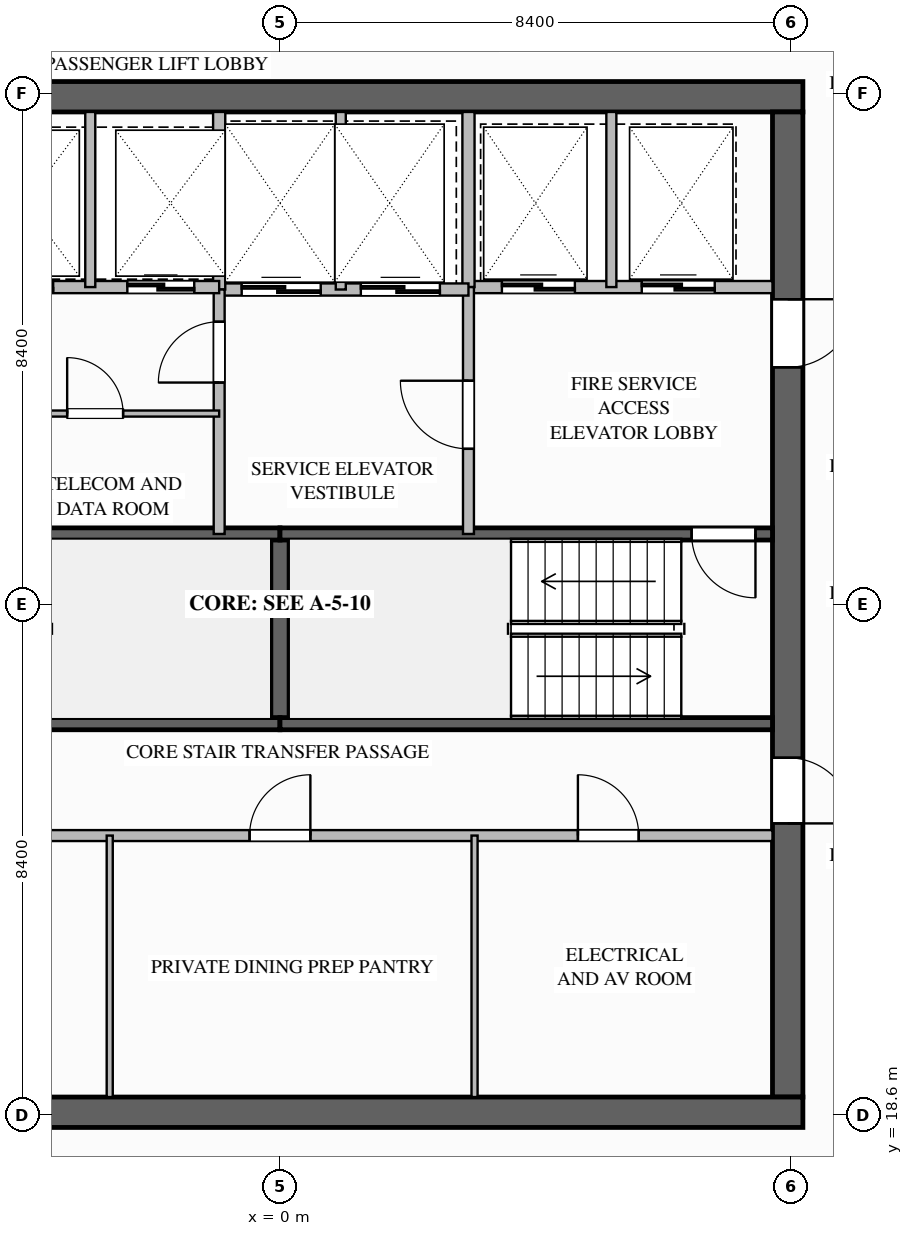
"""IFC4 building model, lengths in metres.
Left out: names, types, materials, properties, quantities, classifications, styles, units other than length and angle.
Written with IfcOpenShell. Run it as: python <this file> out.ifc"""

import sys

from ifc_helpers import new_model, si_unit, direction, frame, frame_2d, origin, place, context, subcontext, project, spatial, rectangle, extrude, element, fill, save


model = new_model("IFC4")
c1 = context("Model", 3, precision=1e-05, world=origin(), true_north=direction((0.0, 1.0)))
c2 = subcontext(c1, "Body", "Model", "MODEL_VIEW")
j1 = project(units=[si_unit("LENGTHUNIT", "METRE"), si_unit("PLANEANGLEUNIT", "RADIAN")], contexts=[c1])
p1 = place(None, origin())
s1 = spatial("IfcSite", under=j1, at=p1, CompositionType="ELEMENT")
p2 = place(p1, origin())
s2 = spatial("IfcBuilding", under=s1, at=p2, CompositionType="ELEMENT")
p3 = place(p2, frame((0.0, 0.0, 208.7)))
s3 = spatial("IfcBuildingStorey", under=s2, at=p3, CompositionType="ELEMENT", Elevation=208.7)
p4 = place(p3, frame((-8.6, 35.35, 0.0), z_axis=(0.0, 0.0, 1.0), x_axis=(1.0, 0.0, 0.0)))
e1 = element("IfcWall", 1, at=p4, inside=s3, PredefinedType="SHEAR", context=c2, shape_type="SweptSolid", body=[
    extrude(rectangle(XDim=17.2, YDim=0.5, at=frame_2d((8.6, 0.0))), origin(), (0.0, 0.0, 1.0), 3.6),
])
p5 = place(p3, frame((8.35, 35.1, 0.0), z_axis=(0.0, 0.0, 1.0), x_axis=(0.0, -1.0, 0.0)))
e2 = element("IfcWall", 2, at=p5, inside=s3, PredefinedType="SHEAR", context=c2, shape_type="SweptSolid", body=[
    extrude(rectangle(XDim=16.2, YDim=0.5, at=frame_2d((8.1, 0.0))), origin(), (0.0, 0.0, 1.0), 3.6),
])
p6 = place(p5, frame((3.08, 0.0, 0.0)))
e3 = element("IfcOpeningElement", 3, at=p6, cuts=e2, PredefinedType="OPENING", context=c2, shape_type="SweptSolid", body=[
    extrude(rectangle(XDim=1.12, YDim=2.1, at=frame_2d((0.56, 1.05))), frame((0.0, 0.26, 0.0), z_axis=(0.0, -1.0, 0.0), x_axis=(1.0, 0.0, 0.0)), (0.0, 0.0, 1.0), 0.52),
])
p7 = place(p5, frame((10.62, 0.0, 0.0)))
e4 = element("IfcOpeningElement", 4, at=p7, cuts=e2, PredefinedType="OPENING", context=c2, shape_type="SweptSolid", body=[
    extrude(rectangle(XDim=1.08, YDim=2.04, at=frame_2d((0.54, 1.02))), frame((0.0, 0.26, 0.0), z_axis=(0.0, -1.0, 0.0), x_axis=(1.0, 0.0, 0.0)), (0.0, 0.0, 1.0), 0.52),
])
p8 = place(p3, frame((8.6, 18.65, 0.0), z_axis=(0.0, 0.0, 1.0), x_axis=(-1.0, 0.0, 0.0)))
e5 = element("IfcWall", 5, at=p8, inside=s3, PredefinedType="SHEAR", context=c2, shape_type="SweptSolid", body=[
    extrude(rectangle(XDim=17.2, YDim=0.5, at=frame_2d((8.6, 0.0))), origin(), (0.0, 0.0, 1.0), 3.6),
])
p9 = place(p3, frame((0.0, 25.04, 0.0), z_axis=(0.0, 0.0, 1.0), x_axis=(0.0, 1.0, 0.0)))
e6 = element("IfcWall", 6, at=p9, inside=s3, PredefinedType="SOLIDWALL", context=c2, shape_type="SweptSolid", body=[
    extrude(rectangle(XDim=3.12, YDim=0.3, at=frame_2d((1.56, 0.0))), origin(), (0.0, 0.0, 1.0), 3.34),
])
p10 = place(p3, frame((-8.1, 25.04, 0.0), z_axis=(0.0, 0.0, 1.0), x_axis=(1.0, 0.0, 0.0)))
e7 = element("IfcWall", 7, at=p10, inside=s3, PredefinedType="SOLIDWALL", context=c2, shape_type="SweptSolid", body=[
    extrude(rectangle(XDim=8.1, YDim=0.2, at=frame_2d((4.05, 0.0))), origin(), (0.0, 0.0, 1.0), 3.34),
])
p11 = place(p10, frame((0.28, 0.0, 0.0)))
e8 = element("IfcOpeningElement", 8, at=p11, cuts=e7, PredefinedType="OPENING", context=c2, shape_type="SweptSolid", body=[
    extrude(rectangle(XDim=1.05, YDim=2.1, at=frame_2d((0.525, 1.05))), frame((0.0, 0.11, 0.0), z_axis=(0.0, -1.0, 0.0), x_axis=(1.0, 0.0, 0.0)), (0.0, 0.0, 1.0), 0.22),
])
for number, where, z_axis, x_axis in (
    (9, (-8.1, 28.16, 0.0), (0.0, 0.0, 1.0), (1.0, 0.0, 0.0)),
    (10, (0.0, 25.04, 0.0), (0.0, 0.0, 1.0), (1.0, 0.0, 0.0)),
):
    element("IfcWall", number, at=place(p3, frame(where, z_axis=z_axis, x_axis=x_axis)), inside=s3, PredefinedType="SOLIDWALL", context=c2, shape_type="SweptSolid", body=[
        extrude(rectangle(XDim=8.1, YDim=0.2, at=frame_2d((4.05, 0.0))), origin(), (0.0, 0.0, 1.0), 3.34),
    ])
p12 = place(p3, frame((8.1, 28.16, 0.0), z_axis=(0.0, 0.0, 1.0), x_axis=(-1.0, 0.0, 0.0)))
e11 = element("IfcWall", 11, at=p12, inside=s3, PredefinedType="SOLIDWALL", context=c2, shape_type="SweptSolid", body=[
    extrude(rectangle(XDim=8.1, YDim=0.2, at=frame_2d((4.05, 0.0))), origin(), (0.0, 0.0, 1.0), 3.34),
])
p13 = place(p12, frame((0.28, 0.0, 0.0)))
e12 = element("IfcOpeningElement", 12, at=p13, cuts=e11, PredefinedType="OPENING", context=c2, shape_type="SweptSolid", body=[
    extrude(rectangle(XDim=1.05, YDim=2.1, at=frame_2d((0.525, 1.05))), frame((0.0, 0.11, 0.0), z_axis=(0.0, -1.0, 0.0), x_axis=(1.0, 0.0, 0.0)), (0.0, 0.0, 1.0), 0.22),
])
p14 = place(p3, frame((3.1, 32.22, 0.0), z_axis=(0.0, 0.0, 1.0), x_axis=(1.0, 0.0, 0.0)))
e13 = element("IfcWall", 13, at=p14, inside=s3, PredefinedType="SOLIDWALL", context=c2, shape_type="SweptSolid", body=[
    extrude(rectangle(XDim=5.0, YDim=0.2, at=frame_2d((2.5, 0.0))), origin(), (0.0, 0.0, 1.0), 3.34),
])
p15 = place(p14, frame((0.55, 0.0, 0.0)))
e14 = element("IfcOpeningElement", 14, at=p15, cuts=e13, PredefinedType="OPENING", context=c2, shape_type="SweptSolid", body=[
    extrude(rectangle(XDim=1.2, YDim=2.2, at=frame_2d((0.6, 1.1))), frame((0.0, 0.11, 0.0), z_axis=(0.0, -1.0, 0.0), x_axis=(1.0, 0.0, 0.0)), (0.0, 0.0, 1.0), 0.22),
])
p16 = place(p14, frame((2.85, 0.0, 0.0)))
e15 = element("IfcOpeningElement", 15, at=p16, cuts=e13, PredefinedType="OPENING", context=c2, shape_type="SweptSolid", body=[
    extrude(rectangle(XDim=1.2, YDim=2.2, at=frame_2d((0.6, 1.1))), frame((0.0, 0.11, 0.0), z_axis=(0.0, -1.0, 0.0), x_axis=(1.0, 0.0, 0.0)), (0.0, 0.0, 1.0), 0.22),
])
p17 = place(p3, frame((3.1, 32.22, 0.0), z_axis=(0.0, 0.0, 1.0), x_axis=(0.0, 1.0, 0.0)))
e16 = element("IfcWall", 16, at=p17, inside=s3, PredefinedType="SOLIDWALL", context=c2, shape_type="SweptSolid", body=[
    extrude(rectangle(XDim=2.88, YDim=0.2, at=frame_2d((1.44, 0.0))), origin(), (0.0, 0.0, 1.0), 3.34),
])
p18 = place(p3, frame((5.45, 32.22, 0.0), z_axis=(0.0, 0.0, 1.0), x_axis=(0.0, 1.0, 0.0)))
e17 = element("IfcWall", 17, at=p18, inside=s3, PredefinedType="PARTITIONING", context=c2, shape_type="SweptSolid", body=[
    extrude(rectangle(XDim=2.88, YDim=0.165, at=frame_2d((1.44, 0.0))), origin(), (0.0, 0.0, 1.0), 3.34),
])
p19 = place(p3, frame((3.1, 28.16, 0.0), z_axis=(0.0, 0.0, 1.0), x_axis=(0.0, 1.0, 0.0)))
e18 = element("IfcWall", 18, at=p19, inside=s3, PredefinedType="SOLIDWALL", context=c2, shape_type="SweptSolid", body=[
    extrude(rectangle(XDim=4.06, YDim=0.18, at=frame_2d((2.03, 0.0))), origin(), (0.0, 0.0, 1.0), 3.34),
])
p20 = place(p19, frame((1.4, 0.0, 0.0)))
e19 = element("IfcOpeningElement", 19, at=p20, cuts=e18, PredefinedType="OPENING", context=c2, shape_type="SweptSolid", body=[
    extrude(rectangle(XDim=1.12, YDim=2.1, at=frame_2d((0.56, 1.05))), frame((0.0, 0.1, 0.0), z_axis=(0.0, -1.0, 0.0), x_axis=(1.0, 0.0, 0.0)), (0.0, 0.0, 1.0), 0.2),
])
p21 = place(p3, frame((-1.0, 32.18, 0.0), z_axis=(0.0, 0.0, 1.0), x_axis=(1.0, 0.0, 0.0)))
e20 = element("IfcWall", 20, at=p21, inside=s3, PredefinedType="SOLIDWALL", context=c2, shape_type="SweptSolid", body=[
    extrude(rectangle(XDim=4.1, YDim=0.2, at=frame_2d((2.05, 0.0))), origin(), (0.0, 0.0, 1.0), 3.34),
])
p22 = place(p21, frame((0.37, 0.0, 0.0)))
e21 = element("IfcOpeningElement", 21, at=p22, cuts=e20, PredefinedType="OPENING", context=c2, shape_type="SweptSolid", body=[
    extrude(rectangle(XDim=1.3, YDim=2.2, at=frame_2d((0.65, 1.1))), frame((0.0, 0.11, 0.0), z_axis=(0.0, -1.0, 0.0), x_axis=(1.0, 0.0, 0.0)), (0.0, 0.0, 1.0), 0.22),
])
p23 = place(p21, frame((2.33, 0.0, 0.0)))
e22 = element("IfcOpeningElement", 22, at=p23, cuts=e20, PredefinedType="OPENING", context=c2, shape_type="SweptSolid", body=[
    extrude(rectangle(XDim=1.3, YDim=2.2, at=frame_2d((0.65, 1.1))), frame((0.0, 0.11, 0.0), z_axis=(0.0, -1.0, 0.0), x_axis=(1.0, 0.0, 0.0)), (0.0, 0.0, 1.0), 0.22),
])
p24 = place(p3, frame((-1.0, 32.18, 0.0), z_axis=(0.0, 0.0, 1.0), x_axis=(0.0, 1.0, 0.0)))
e23 = element("IfcWall", 23, at=p24, inside=s3, PredefinedType="SOLIDWALL", context=c2, shape_type="SweptSolid", body=[
    extrude(rectangle(XDim=2.92, YDim=0.2, at=frame_2d((1.46, 0.0))), origin(), (0.0, 0.0, 1.0), 3.34),
])
p25 = place(p3, frame((1.0, 32.18, 0.0), z_axis=(0.0, 0.0, 1.0), x_axis=(0.0, 1.0, 0.0)))
e24 = element("IfcWall", 24, at=p25, inside=s3, PredefinedType="PARTITIONING", context=c2, shape_type="SweptSolid", body=[
    extrude(rectangle(XDim=2.92, YDim=0.165, at=frame_2d((1.46, 0.0))), origin(), (0.0, 0.0, 1.0), 3.34),
])
p26 = place(p3, frame((-1.0, 28.16, 0.0), z_axis=(0.0, 0.0, 1.0), x_axis=(0.0, 1.0, 0.0)))
e25 = element("IfcWall", 25, at=p26, inside=s3, PredefinedType="SOLIDWALL", context=c2, shape_type="SweptSolid", body=[
    extrude(rectangle(XDim=4.02, YDim=0.18, at=frame_2d((2.01, 0.0))), origin(), (0.0, 0.0, 1.0), 3.34),
])
p27 = place(p26, frame((2.49, 0.0, 0.0)))
e26 = element("IfcOpeningElement", 26, at=p27, cuts=e25, PredefinedType="OPENING", context=c2, shape_type="SweptSolid", body=[
    extrude(rectangle(XDim=1.0, YDim=2.1, at=frame_2d((0.5, 1.05))), frame((0.0, 0.1, 0.0), z_axis=(0.0, -1.0, 0.0), x_axis=(1.0, 0.0, 0.0)), (0.0, 0.0, 1.0), 0.2),
])
p28 = place(p3, frame((-8.1, 32.22, 0.0), z_axis=(0.0, 0.0, 1.0), x_axis=(1.0, 0.0, 0.0)))
e27 = element("IfcWall", 27, at=p28, inside=s3, PredefinedType="SOLIDWALL", context=c2, shape_type="SweptSolid", body=[
    extrude(rectangle(XDim=7.1, YDim=0.2, at=frame_2d((3.55, 0.0))), origin(), (0.0, 0.0, 1.0), 3.34),
])
p29 = place(p28, frame((0.95, 0.0, 0.0)))
e28 = element("IfcOpeningElement", 28, at=p29, cuts=e27, PredefinedType="OPENING", context=c2, shape_type="SweptSolid", body=[
    extrude(rectangle(XDim=1.1, YDim=2.2, at=frame_2d((0.55, 1.1))), frame((0.0, 0.11, 0.0), z_axis=(0.0, -1.0, 0.0), x_axis=(1.0, 0.0, 0.0)), (0.0, 0.0, 1.0), 0.22),
])
p30 = place(p28, frame((3.27, 0.0, 0.0)))
e29 = element("IfcOpeningElement", 29, at=p30, cuts=e27, PredefinedType="OPENING", context=c2, shape_type="SweptSolid", body=[
    extrude(rectangle(XDim=1.1, YDim=2.2, at=frame_2d((0.55, 1.1))), frame((0.0, 0.11, 0.0), z_axis=(0.0, -1.0, 0.0), x_axis=(1.0, 0.0, 0.0)), (0.0, 0.0, 1.0), 0.22),
])
p31 = place(p28, frame((5.59, 0.0, 0.0)))
e30 = element("IfcOpeningElement", 30, at=p31, cuts=e27, PredefinedType="OPENING", context=c2, shape_type="SweptSolid", body=[
    extrude(rectangle(XDim=1.1, YDim=2.2, at=frame_2d((0.55, 1.1))), frame((0.0, 0.11, 0.0), z_axis=(0.0, -1.0, 0.0), x_axis=(1.0, 0.0, 0.0)), (0.0, 0.0, 1.0), 0.22),
])
p32 = place(p3, frame((-3.12, 32.22, 0.0), z_axis=(0.0, 0.0, 1.0), x_axis=(0.0, 1.0, 0.0)))
e31 = element("IfcWall", 31, at=p32, inside=s3, PredefinedType="PARTITIONING", context=c2, shape_type="SweptSolid", body=[
    extrude(rectangle(XDim=2.88, YDim=0.165, at=frame_2d((1.44, 0.0))), origin(), (0.0, 0.0, 1.0), 3.34),
])
p33 = place(p3, frame((-8.1, 30.14, 0.0), z_axis=(0.0, 0.0, 1.0), x_axis=(1.0, 0.0, 0.0)))
e32 = element("IfcWall", 32, at=p33, inside=s3, PredefinedType="PARTITIONING", context=c2, shape_type="SweptSolid", body=[
    extrude(rectangle(XDim=7.1, YDim=0.1, at=frame_2d((3.55, 0.0))), origin(), (0.0, 0.0, 1.0), 3.34),
])
p34 = place(p33, frame((1.1, 0.0, 0.0)))
e33 = element("IfcOpeningElement", 33, at=p34, cuts=e32, PredefinedType="OPENING", context=c2, shape_type="SweptSolid", body=[
    extrude(rectangle(XDim=0.92, YDim=2.1, at=frame_2d((0.46, 1.05))), frame((0.0, 0.06, 0.0), z_axis=(0.0, -1.0, 0.0), x_axis=(1.0, 0.0, 0.0)), (0.0, 0.0, 1.0), 0.12),
])
p35 = place(p33, frame((4.6, 0.0, 0.0)))
e34 = element("IfcOpeningElement", 34, at=p35, cuts=e32, PredefinedType="OPENING", context=c2, shape_type="SweptSolid", body=[
    extrude(rectangle(XDim=0.92, YDim=2.1, at=frame_2d((0.46, 1.05))), frame((0.0, 0.06, 0.0), z_axis=(0.0, -1.0, 0.0), x_axis=(1.0, 0.0, 0.0)), (0.0, 0.0, 1.0), 0.12),
])
p36 = place(p3, frame((-8.1, 23.2, 0.0), z_axis=(0.0, 0.0, 1.0), x_axis=(1.0, 0.0, 0.0)))
e35 = element("IfcWall", 35, at=p36, inside=s3, PredefinedType="SOLIDWALL", context=c2, shape_type="SweptSolid", body=[
    extrude(rectangle(XDim=16.2, YDim=0.18, at=frame_2d((8.1, 0.0))), origin(), (0.0, 0.0, 1.0), 3.34),
])
p37 = place(p36, frame((1.8, 0.0, 0.0)))
e36 = element("IfcOpeningElement", 36, at=p37, cuts=e35, PredefinedType="OPENING", context=c2, shape_type="SweptSolid", body=[
    extrude(rectangle(XDim=1.0, YDim=2.1, at=frame_2d((0.5, 1.05))), frame((0.0, 0.1, 0.0), z_axis=(0.0, -1.0, 0.0), x_axis=(1.0, 0.0, 0.0)), (0.0, 0.0, 1.0), 0.2),
])
p38 = place(p36, frame((7.6, 0.0, 0.0)))
e37 = element("IfcOpeningElement", 37, at=p38, cuts=e35, PredefinedType="OPENING", context=c2, shape_type="SweptSolid", body=[
    extrude(rectangle(XDim=1.0, YDim=2.1, at=frame_2d((0.5, 1.05))), frame((0.0, 0.1, 0.0), z_axis=(0.0, -1.0, 0.0), x_axis=(1.0, 0.0, 0.0)), (0.0, 0.0, 1.0), 0.2),
])
p39 = place(p36, frame((13.0, 0.0, 0.0)))
e38 = element("IfcOpeningElement", 38, at=p39, cuts=e35, PredefinedType="OPENING", context=c2, shape_type="SweptSolid", body=[
    extrude(rectangle(XDim=1.0, YDim=2.1, at=frame_2d((0.5, 1.05))), frame((0.0, 0.1, 0.0), z_axis=(0.0, -1.0, 0.0), x_axis=(1.0, 0.0, 0.0)), (0.0, 0.0, 1.0), 0.2),
])
for number, where, z_axis, x_axis in (
    (39, (-2.8, 18.9, 0.0), (0.0, 0.0, 1.0), (0.0, 1.0, 0.0)),
    (40, (3.2, 18.9, 0.0), (0.0, 0.0, 1.0), (0.0, 1.0, 0.0)),
):
    element("IfcWall", number, at=place(p3, frame(where, z_axis=z_axis, x_axis=x_axis)), inside=s3, PredefinedType="PARTITIONING", context=c2, shape_type="SweptSolid", body=[
        extrude(rectangle(XDim=4.3, YDim=0.1, at=frame_2d((2.15, 0.0))), origin(), (0.0, 0.0, 1.0), 3.34),
    ])
p40 = place(p13, origin())
e41 = element("IfcDoor", 41, at=p40, inside=s3, OperationType="SINGLE_SWING_LEFT", PredefinedType="DOOR", context=c2, shape_type="SweptSolid", body=[
    extrude(rectangle(XDim=1.05, YDim=2.1, at=frame_2d((0.525, 1.05))), frame((0.0, 0.025, 0.0), z_axis=(0.0, -1.0, 0.0), x_axis=(1.0, 0.0, 0.0)), (0.0, 0.0, 1.0), 0.05),
])
fill(e12, e41)
p41 = place(p15, origin())
e42 = element("IfcDoor", 42, at=p41, inside=s3, OperationType="SLIDING_TO_LEFT", PredefinedType="DOOR", context=c2, shape_type="SweptSolid", body=[
    extrude(rectangle(XDim=1.2, YDim=2.2, at=frame_2d((0.6, 1.1))), frame((0.0, 0.025, 0.0), z_axis=(0.0, -1.0, 0.0), x_axis=(1.0, 0.0, 0.0)), (0.0, 0.0, 1.0), 0.05),
])
fill(e14, e42)
p42 = place(p16, origin())
e43 = element("IfcDoor", 43, at=p42, inside=s3, OperationType="SLIDING_TO_LEFT", PredefinedType="DOOR", context=c2, shape_type="SweptSolid", body=[
    extrude(rectangle(XDim=1.2, YDim=2.2, at=frame_2d((0.6, 1.1))), frame((0.0, 0.025, 0.0), z_axis=(0.0, -1.0, 0.0), x_axis=(1.0, 0.0, 0.0)), (0.0, 0.0, 1.0), 0.05),
])
fill(e15, e43)
p43 = place(p20, origin())
e44 = element("IfcDoor", 44, at=p43, inside=s3, OperationType="SINGLE_SWING_RIGHT", PredefinedType="DOOR", context=c2, shape_type="SweptSolid", body=[
    extrude(rectangle(XDim=1.12, YDim=2.1, at=frame_2d((0.56, 1.05))), frame((0.0, 0.025, 0.0), z_axis=(0.0, -1.0, 0.0), x_axis=(1.0, 0.0, 0.0)), (0.0, 0.0, 1.0), 0.05),
])
fill(e19, e44)
p44 = place(p6, origin())
e45 = element("IfcDoor", 45, at=p44, inside=s3, OperationType="SINGLE_SWING_LEFT", PredefinedType="DOOR", context=c2, shape_type="SweptSolid", body=[
    extrude(rectangle(XDim=1.12, YDim=2.1, at=frame_2d((0.56, 1.05))), frame((0.0, 0.025, 0.0), z_axis=(0.0, -1.0, 0.0), x_axis=(1.0, 0.0, 0.0)), (0.0, 0.0, 1.0), 0.05),
])
fill(e3, e45)
p45 = place(p22, origin())
e46 = element("IfcDoor", 46, at=p45, inside=s3, OperationType="SLIDING_TO_LEFT", PredefinedType="DOOR", context=c2, shape_type="SweptSolid", body=[
    extrude(rectangle(XDim=1.3, YDim=2.2, at=frame_2d((0.65, 1.1))), frame((0.0, 0.025, 0.0), z_axis=(0.0, -1.0, 0.0), x_axis=(1.0, 0.0, 0.0)), (0.0, 0.0, 1.0), 0.05),
])
fill(e21, e46)
p46 = place(p23, origin())
e47 = element("IfcDoor", 47, at=p46, inside=s3, OperationType="SLIDING_TO_LEFT", PredefinedType="DOOR", context=c2, shape_type="SweptSolid", body=[
    extrude(rectangle(XDim=1.3, YDim=2.2, at=frame_2d((0.65, 1.1))), frame((0.0, 0.025, 0.0), z_axis=(0.0, -1.0, 0.0), x_axis=(1.0, 0.0, 0.0)), (0.0, 0.0, 1.0), 0.05),
])
fill(e22, e47)
p47 = place(p27, origin())
e48 = element("IfcDoor", 48, at=p47, inside=s3, OperationType="SINGLE_SWING_LEFT", PredefinedType="DOOR", context=c2, shape_type="SweptSolid", body=[
    extrude(rectangle(XDim=1.0, YDim=2.1, at=frame_2d((0.5, 1.05))), frame((0.0, 0.025, 0.0), z_axis=(0.0, -1.0, 0.0), x_axis=(1.0, 0.0, 0.0)), (0.0, 0.0, 1.0), 0.05),
])
fill(e26, e48)
p48 = place(p30, origin())
e49 = element("IfcDoor", 49, at=p48, inside=s3, OperationType="SLIDING_TO_LEFT", PredefinedType="DOOR", context=c2, shape_type="SweptSolid", body=[
    extrude(rectangle(XDim=1.1, YDim=2.2, at=frame_2d((0.55, 1.1))), frame((0.0, 0.025, 0.0), z_axis=(0.0, -1.0, 0.0), x_axis=(1.0, 0.0, 0.0)), (0.0, 0.0, 1.0), 0.05),
])
fill(e29, e49)
p49 = place(p31, origin())
e50 = element("IfcDoor", 50, at=p49, inside=s3, OperationType="SLIDING_TO_LEFT", PredefinedType="DOOR", context=c2, shape_type="SweptSolid", body=[
    extrude(rectangle(XDim=1.1, YDim=2.2, at=frame_2d((0.55, 1.1))), frame((0.0, 0.025, 0.0), z_axis=(0.0, -1.0, 0.0), x_axis=(1.0, 0.0, 0.0)), (0.0, 0.0, 1.0), 0.05),
])
fill(e30, e50)
p50 = place(p35, origin())
e51 = element("IfcDoor", 51, at=p50, inside=s3, OperationType="SINGLE_SWING_LEFT", PredefinedType="DOOR", context=c2, shape_type="SweptSolid", body=[
    extrude(rectangle(XDim=0.92, YDim=2.1, at=frame_2d((0.46, 1.05))), frame((0.0, 0.025, 0.0), z_axis=(0.0, -1.0, 0.0), x_axis=(1.0, 0.0, 0.0)), (0.0, 0.0, 1.0), 0.05),
])
fill(e34, e51)
p51 = place(p7, origin())
e52 = element("IfcDoor", 52, at=p51, inside=s3, OperationType="SINGLE_SWING_RIGHT", PredefinedType="DOOR", context=c2, shape_type="SweptSolid", body=[
    extrude(rectangle(XDim=1.08, YDim=2.04, at=frame_2d((0.54, 1.02))), frame((0.0, 0.025, 0.0), z_axis=(0.0, -1.0, 0.0), x_axis=(1.0, 0.0, 0.0)), (0.0, 0.0, 1.0), 0.05),
])
fill(e4, e52)
p52 = place(p38, origin())
e53 = element("IfcDoor", 53, at=p52, inside=s3, OperationType="SINGLE_SWING_RIGHT", PredefinedType="DOOR", context=c2, shape_type="SweptSolid", body=[
    extrude(rectangle(XDim=1.0, YDim=2.1, at=frame_2d((0.5, 1.05))), frame((0.0, 0.025, 0.0), z_axis=(0.0, -1.0, 0.0), x_axis=(1.0, 0.0, 0.0)), (0.0, 0.0, 1.0), 0.05),
])
fill(e37, e53)
p53 = place(p39, origin())
e54 = element("IfcDoor", 54, at=p53, inside=s3, OperationType="SINGLE_SWING_LEFT", PredefinedType="DOOR", context=c2, shape_type="SweptSolid", body=[
    extrude(rectangle(XDim=1.0, YDim=2.1, at=frame_2d((0.5, 1.05))), frame((0.0, 0.025, 0.0), z_axis=(0.0, -1.0, 0.0), x_axis=(1.0, 0.0, 0.0)), (0.0, 0.0, 1.0), 0.05),
])
fill(e38, e54)
save(model, sys.argv[1])
